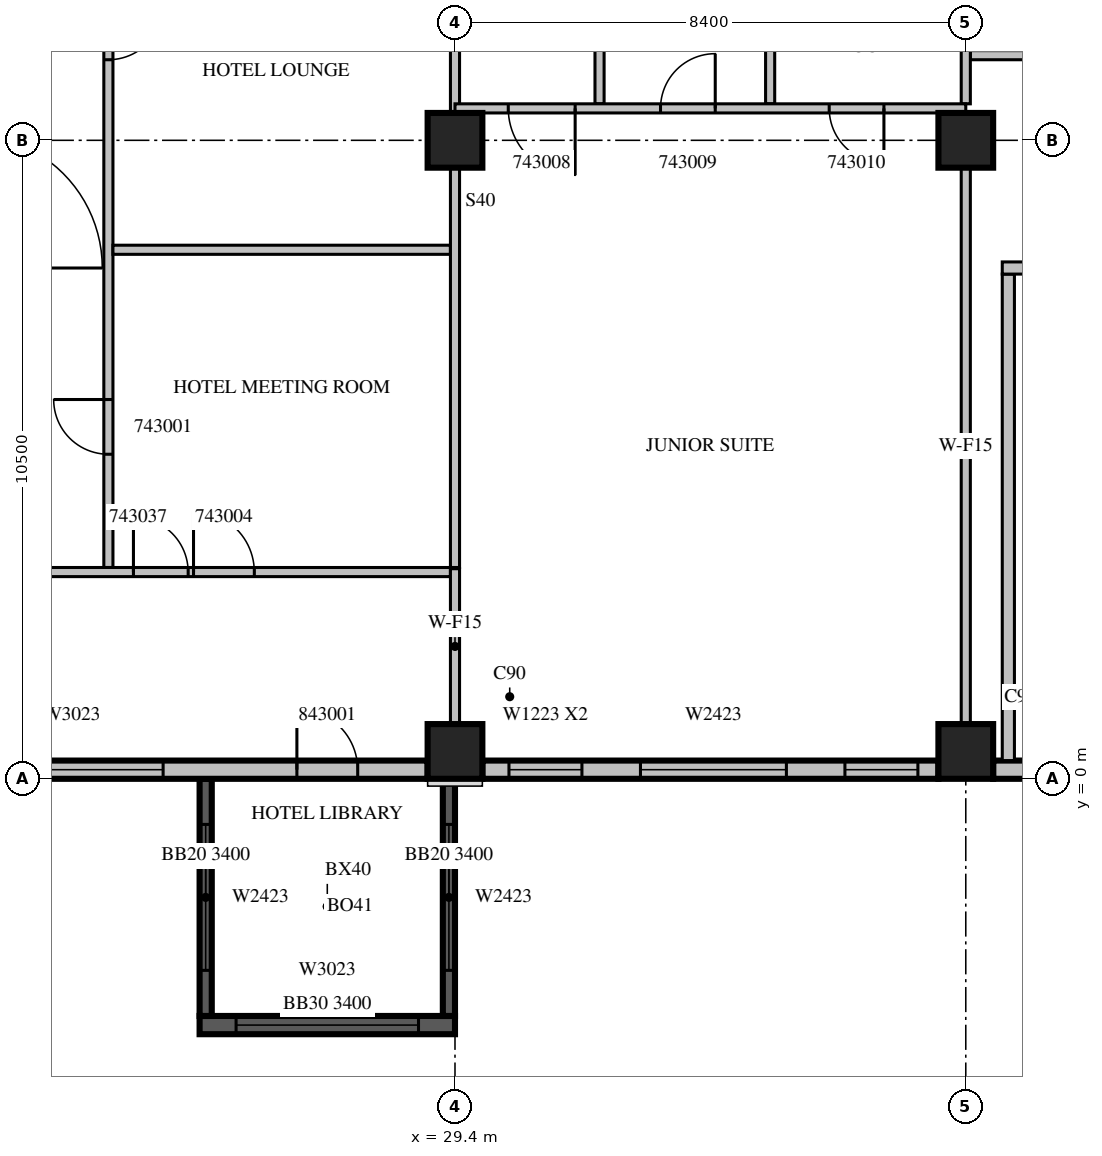
"""IFC4 building model, lengths in metres.
Left out: names, types, materials, properties, quantities, classifications, styles, units other than length and angle.
Written with IfcOpenShell. Run it as: python <this file> out.ifc"""

import sys

from ifc_helpers import new_model, si_unit, direction, frame, frame_2d, origin, origin_2d, place, context, subcontext, project, spatial, rectangle, extrude, source, transform, mapped, element, fill, save


model = new_model("IFC4")
c1 = context("Model", 3, precision=1e-05, world=origin(), true_north=direction((0.0, 1.0)))
c2 = subcontext(c1, "Body", "Model", "MODEL_VIEW")
j1 = project(units=[si_unit("LENGTHUNIT", "METRE"), si_unit("PLANEANGLEUNIT", "RADIAN")], contexts=[c1])
p1 = place(None, origin())
s1 = spatial("IfcSite", under=j1, at=p1, CompositionType="ELEMENT")
p2 = place(p1, origin())
s2 = spatial("IfcBuilding", under=s1, at=p2, CompositionType="ELEMENT")
p3 = place(p2, frame((0.0, 0.0, 196.8)))
s3 = spatial("IfcBuildingStorey", under=s2, at=p3, CompositionType="ELEMENT", Elevation=196.8)
m1 = source(origin(), c2, "Body", "SweptSolid", [
    extrude(rectangle(XDim=0.9, YDim=0.9, at=origin_2d()), origin(), (0.0, 0.0, 1.0), 3.8),
])
for number, where, z_axis, x_axis in (
    (1, (29.4, 0.45, 0.0), (0.0, 0.0, 1.0), (1.0, 0.0, 0.0)),
    (2, (37.8, 0.45, 0.0), (0.0, 0.0, 1.0), (1.0, 0.0, 0.0)),
    (3, (29.4, 10.5, 0.0), (0.0, 0.0, 1.0), (1.0, 0.0, 0.0)),
    (4, (37.8, 10.5, 0.0), (0.0, 0.0, 1.0), (1.0, 0.0, 0.0)),
):
    element("IfcColumn", number, at=place(p3, frame(where, z_axis=z_axis, x_axis=x_axis)), inside=s3, PredefinedType="COLUMN", context=c2, shape_type="MappedRepresentation", body=[
        mapped(m1, transform((0.0, 0.0, 0.0), scale=1.0)),
    ])
m2 = source(origin(), c2, "Body", "SweptSolid", [
    extrude(rectangle(XDim=4.2, YDim=0.3, at=frame_2d((2.1, 0.0))), origin(), (0.0, 0.0, 1.0), 3.4),
])
p4 = place(p3, frame((25.2, -4.05, 0.0), z_axis=(0.0, 0.0, 1.0), x_axis=(1.0, 0.0, 0.0)))
e5 = element("IfcWall", 5, at=p4, inside=s3, PredefinedType="SOLIDWALL", context=c2, shape_type="MappedRepresentation", body=[
    mapped(m2, transform((0.0, 0.0, 0.0), scale=1.0)),
])
m3 = source(origin(), c2, "Body", "SweptSolid", [
    extrude(rectangle(XDim=3.0, YDim=2.3, at=frame_2d((1.5, 1.15))), frame((0.0, 0.16, 0.0), z_axis=(0.0, -1.0, 0.0), x_axis=(1.0, 0.0, 0.0)), (0.0, 0.0, 1.0), 0.32),
])
p5 = place(p4, frame((0.6, 0.0, 0.6)))
e6 = element("IfcOpeningElement", 6, at=p5, cuts=e5, PredefinedType="OPENING", context=c2, shape_type="MappedRepresentation", body=[
    mapped(m3, transform((0.0, 0.0, 0.0), scale=1.0)),
])
m4 = source(origin(), c2, "Body", "SweptSolid", [
    extrude(rectangle(XDim=3.9, YDim=0.2, at=frame_2d((1.95, 0.0))), origin(), (0.0, 0.0, 1.0), 3.4),
])
p6 = place(p3, frame((25.3, 0.0, 0.0), z_axis=(0.0, 0.0, 1.0), x_axis=(0.0, -1.0, 0.0)))
e7 = element("IfcWall", 7, at=p6, inside=s3, PredefinedType="SOLIDWALL", context=c2, shape_type="MappedRepresentation", body=[
    mapped(m4, transform((0.0, 0.0, 0.0), scale=1.0)),
])
m5 = source(origin(), c2, "Body", "SweptSolid", [
    extrude(rectangle(XDim=2.4, YDim=2.3, at=frame_2d((1.2, 1.15))), frame((0.0, 0.11, 0.0), z_axis=(0.0, -1.0, 0.0), x_axis=(1.0, 0.0, 0.0)), (0.0, 0.0, 1.0), 0.22),
])
p7 = place(p6, frame((0.75, 0.0, 0.6)))
e8 = element("IfcOpeningElement", 8, at=p7, cuts=e7, PredefinedType="OPENING", context=c2, shape_type="MappedRepresentation", body=[
    mapped(m5, transform((0.0, 0.0, 0.0), scale=1.0)),
])
p8 = place(p3, frame((29.3, 0.0, 0.0), z_axis=(0.0, 0.0, 1.0), x_axis=(0.0, -1.0, 0.0)))
e9 = element("IfcWall", 9, at=p8, inside=s3, PredefinedType="SOLIDWALL", context=c2, shape_type="MappedRepresentation", body=[
    mapped(m4, transform((0.0, 0.0, 0.0), scale=1.0)),
])
p9 = place(p8, frame((0.75, 0.0, 0.6)))
e10 = element("IfcOpeningElement", 10, at=p9, cuts=e9, PredefinedType="OPENING", context=c2, shape_type="MappedRepresentation", body=[
    mapped(m5, transform((0.0, 0.0, 0.0), scale=1.0)),
])
m6 = source(origin(), c2, "Body", "SweptSolid", [
    extrude(rectangle(XDim=7.5, YDim=0.3, at=frame_2d((3.75, 0.0))), origin(), (0.0, 0.0, 1.0), 3.4),
])
p10 = place(p3, frame((21.45, 0.15, 0.0), z_axis=(0.0, 0.0, 1.0), x_axis=(1.0, 0.0, 0.0)))
e11 = element("IfcWall", 11, at=p10, inside=s3, PredefinedType="STANDARD", context=c2, shape_type="MappedRepresentation", body=[
    mapped(m6, transform((0.0, 0.0, 0.0), scale=1.0)),
])
p11 = place(p10, frame((0.15, 0.0, 0.6)))
e12 = element("IfcOpeningElement", 12, at=p11, cuts=e11, PredefinedType="OPENING", context=c2, shape_type="MappedRepresentation", body=[
    mapped(m3, transform((0.0, 0.0, 0.0), scale=1.0)),
])
m7 = source(origin(), c2, "Body", "SweptSolid", [
    extrude(rectangle(XDim=1.0, YDim=2.1, at=frame_2d((0.5, 1.05))), frame((0.0, 0.16, 0.0), z_axis=(0.0, -1.0, 0.0), x_axis=(1.0, 0.0, 0.0)), (0.0, 0.0, 1.0), 0.32),
])
p12 = place(p10, frame((5.35, 0.0, 0.0)))
e13 = element("IfcOpeningElement", 13, at=p12, cuts=e11, PredefinedType="OPENING", context=c2, shape_type="MappedRepresentation", body=[
    mapped(m7, transform((0.0, 0.0, 0.0), scale=1.0)),
])
p13 = place(p3, frame((29.85, 0.15, 0.0), z_axis=(0.0, 0.0, 1.0), x_axis=(1.0, 0.0, 0.0)))
e14 = element("IfcWall", 14, at=p13, inside=s3, PredefinedType="STANDARD", context=c2, shape_type="MappedRepresentation", body=[
    mapped(m6, transform((0.0, 0.0, 0.0), scale=1.0)),
])
m8 = source(origin(), c2, "Body", "SweptSolid", [
    extrude(rectangle(XDim=1.2, YDim=2.3, at=frame_2d((0.6, 1.15))), frame((0.0, 0.16, 0.0), z_axis=(0.0, -1.0, 0.0), x_axis=(1.0, 0.0, 0.0)), (0.0, 0.0, 1.0), 0.32),
])
p14 = place(p13, frame((0.438, 0.0, 0.6)))
e15 = element("IfcOpeningElement", 15, at=p14, cuts=e14, PredefinedType="OPENING", context=c2, shape_type="MappedRepresentation", body=[
    mapped(m8, transform((0.0, 0.0, 0.0), scale=1.0)),
])
p15 = place(p13, frame((5.963, 0.0, 0.6)))
e16 = element("IfcOpeningElement", 16, at=p15, cuts=e14, PredefinedType="OPENING", context=c2, shape_type="MappedRepresentation", body=[
    mapped(m8, transform((0.0, 0.0, 0.0), scale=1.0)),
])
m9 = source(origin(), c2, "Body", "SweptSolid", [
    extrude(rectangle(XDim=2.4, YDim=2.3, at=frame_2d((1.2, 1.15))), frame((0.0, 0.16, 0.0), z_axis=(0.0, -1.0, 0.0), x_axis=(1.0, 0.0, 0.0)), (0.0, 0.0, 1.0), 0.32),
])
p16 = place(p13, frame((2.6, 0.0, 0.6)))
e17 = element("IfcOpeningElement", 17, at=p16, cuts=e14, PredefinedType="OPENING", context=c2, shape_type="MappedRepresentation", body=[
    mapped(m9, transform((0.0, 0.0, 0.0), scale=1.0)),
])
m10 = source(origin(), c2, "Body", "SweptSolid", [
    extrude(rectangle(XDim=1.95, YDim=0.3, at=frame_2d((0.975, 0.0))), origin(), (0.0, 0.0, 1.0), 3.4),
])
p17 = place(p3, frame((38.25, 0.15, 0.0), z_axis=(0.0, 0.0, 1.0), x_axis=(1.0, 0.0, 0.0)))
e18 = element("IfcWall", 18, at=p17, inside=s3, PredefinedType="STANDARD", context=c2, shape_type="MappedRepresentation", body=[
    mapped(m10, transform((0.0, 0.0, 0.0), scale=1.0)),
])
m11 = source(origin(), c2, "Body", "SweptSolid", [
    extrude(rectangle(XDim=8.0, YDim=0.2, at=frame_2d((4.0, 0.0))), origin(), (0.0, 0.0, 1.0), 3.4),
])
p18 = place(p3, frame((38.5, 0.3, 0.0), z_axis=(0.0, 0.0, 1.0), x_axis=(0.0, 1.0, 0.0)))
e19 = element("IfcWall", 19, at=p18, inside=s3, PredefinedType="PARTITIONING", context=c2, shape_type="MappedRepresentation", body=[
    mapped(m11, transform((0.0, 0.0, 0.0), scale=1.0)),
])
m12 = source(origin(), c2, "Body", "SweptSolid", [
    extrude(rectangle(XDim=5.45, YDim=0.2, at=frame_2d((2.725, 0.0))), origin(), (0.0, 0.0, 1.0), 3.4),
])
p19 = place(p3, frame((38.4, 8.4, 0.0), z_axis=(0.0, 0.0, 1.0), x_axis=(1.0, 0.0, 0.0)))
e20 = element("IfcWall", 20, at=p19, inside=s3, PredefinedType="PARTITIONING", context=c2, shape_type="MappedRepresentation", body=[
    mapped(m12, transform((0.0, 0.0, 0.0), scale=1.0)),
])
m13 = source(origin(), c2, "Body", "SweptSolid", [
    extrude(rectangle(XDim=1.2, YDim=2.1, at=frame_2d((0.6, 1.05))), frame((0.0, 0.11, 0.0), z_axis=(0.0, -1.0, 0.0), x_axis=(1.0, 0.0, 0.0)), (0.0, 0.0, 1.0), 0.22),
])
p20 = place(p19, frame((0.4, 0.0, 0.0)))
e21 = element("IfcOpeningElement", 21, at=p20, cuts=e20, PredefinedType="OPENING", context=c2, shape_type="MappedRepresentation", body=[
    mapped(m13, transform((0.0, 0.0, 0.0), scale=1.0)),
])
m14 = source(origin(), c2, "Body", "SweptSolid", [
    extrude(rectangle(XDim=0.9, YDim=2.1, at=frame_2d((0.45, 1.05))), frame((0.0, 0.11, 0.0), z_axis=(0.0, -1.0, 0.0), x_axis=(1.0, 0.0, 0.0)), (0.0, 0.0, 1.0), 0.22),
])
p21 = place(p19, frame((3.25, 0.0, 0.0)))
e22 = element("IfcOpeningElement", 22, at=p21, cuts=e20, PredefinedType="OPENING", context=c2, shape_type="MappedRepresentation", body=[
    mapped(m14, transform((0.0, 0.0, 0.0), scale=1.0)),
])
p22 = place(p3, frame((23.7, 14.7, 0.0), z_axis=(0.0, 0.0, 1.0), x_axis=(0.0, -1.0, 0.0)))
e23 = element("IfcWall", 23, at=p22, inside=s3, PredefinedType="PARTITIONING", context=c2, shape_type="SweptSolid", body=[
    extrude(rectangle(XDim=11.225, YDim=0.15, at=frame_2d((5.612, 0.0))), origin(), (0.0, 0.0, 1.0), 3.4),
])
m15 = source(origin(), c2, "Body", "SweptSolid", [
    extrude(rectangle(XDim=0.9, YDim=2.1, at=frame_2d((0.45, 1.05))), frame((0.0, 0.085, 0.0), z_axis=(0.0, -1.0, 0.0), x_axis=(1.0, 0.0, 0.0)), (0.0, 0.0, 1.0), 0.17),
])
p23 = place(p22, frame((8.463, 0.0, 0.0)))
e24 = element("IfcOpeningElement", 24, at=p23, cuts=e23, PredefinedType="OPENING", context=c2, shape_type="MappedRepresentation", body=[
    mapped(m15, transform((0.0, 0.0, 0.0), scale=1.0)),
])
p24 = place(p22, frame((1.975, 0.0, 0.0)))
e25 = element("IfcOpeningElement", 25, at=p24, cuts=e23, PredefinedType="OPENING", context=c2, shape_type="MappedRepresentation", body=[
    mapped(m15, transform((0.0, 0.0, 0.0), scale=1.0)),
])
m16 = source(origin(), c2, "Body", "SweptSolid", [
    extrude(rectangle(XDim=5.55, YDim=0.15, at=frame_2d((2.775, 0.0))), origin(), (0.0, 0.0, 1.0), 3.4),
])
p25 = place(p3, frame((29.325, 8.7, 0.0), z_axis=(0.0, 0.0, 1.0), x_axis=(-1.0, 0.0, 0.0)))
e26 = element("IfcWall", 26, at=p25, inside=s3, PredefinedType="PARTITIONING", context=c2, shape_type="MappedRepresentation", body=[
    mapped(m16, transform((0.0, 0.0, 0.0), scale=1.0)),
])
m17 = source(origin(), c2, "Body", "SweptSolid", [
    extrude(rectangle(XDim=6.576, YDim=0.15, at=frame_2d((3.288, 0.0))), origin(), (0.0, 0.0, 1.0), 3.4),
])
p26 = place(p3, frame((29.4, 3.475, 0.0), z_axis=(0.0, 0.0, 1.0), x_axis=(0.0, 1.0, 0.0)))
e27 = element("IfcWall", 27, at=p26, inside=s3, PredefinedType="PARTITIONING", context=c2, shape_type="MappedRepresentation", body=[
    mapped(m17, transform((0.0, 0.0, 0.0), scale=1.0)),
])
m18 = source(origin(), c2, "Body", "SweptSolid", [
    extrude(rectangle(XDim=3.751, YDim=0.15, at=frame_2d((1.875, 0.0))), origin(), (0.0, 0.0, 1.0), 3.4),
])
p27 = place(p3, frame((29.4, 10.949, 0.0), z_axis=(0.0, 0.0, 1.0), x_axis=(0.0, 1.0, 0.0)))
e28 = element("IfcWall", 28, at=p27, inside=s3, PredefinedType="PARTITIONING", context=c2, shape_type="MappedRepresentation", body=[
    mapped(m18, transform((0.0, 0.0, 0.0), scale=1.0)),
])
m19 = source(origin(), c2, "Body", "SweptSolid", [
    extrude(rectangle(XDim=7.525, YDim=0.15, at=frame_2d((3.763, 0.0))), origin(), (0.0, 0.0, 1.0), 3.4),
])
p28 = place(p3, frame((21.8, 3.4, 0.0), z_axis=(0.0, 0.0, 1.0), x_axis=(1.0, 0.0, 0.0)))
e29 = element("IfcWall", 29, at=p28, inside=s3, PredefinedType="PARTITIONING", context=c2, shape_type="MappedRepresentation", body=[
    mapped(m19, transform((0.0, 0.0, 0.0), scale=1.0)),
])
m20 = source(origin(), c2, "Body", "SweptSolid", [
    extrude(rectangle(XDim=1.0, YDim=2.1, at=frame_2d((0.5, 1.05))), frame((0.0, 0.085, 0.0), z_axis=(0.0, -1.0, 0.0), x_axis=(1.0, 0.0, 0.0)), (0.0, 0.0, 1.0), 0.17),
])
p29 = place(p28, frame((3.3, 0.0, 0.0)))
e30 = element("IfcOpeningElement", 30, at=p29, cuts=e29, PredefinedType="OPENING", context=c2, shape_type="MappedRepresentation", body=[
    mapped(m20, transform((0.0, 0.0, 0.0), scale=1.0)),
])
p30 = place(p28, frame((2.312, 0.0, 0.0)))
e31 = element("IfcOpeningElement", 31, at=p30, cuts=e29, PredefinedType="OPENING", context=c2, shape_type="MappedRepresentation", body=[
    mapped(m15, transform((0.0, 0.0, 0.0), scale=1.0)),
])
m21 = source(origin(), c2, "Body", "SweptSolid", [
    extrude(rectangle(XDim=6.45, YDim=0.15, at=frame_2d((3.225, 0.0))), origin(), (0.0, 0.0, 1.0), 3.4),
])
p31 = place(p3, frame((37.875, 11.9, 0.0), z_axis=(0.0, 0.0, 1.0), x_axis=(1.0, 0.0, 0.0)))
e32 = element("IfcWall", 32, at=p31, inside=s3, PredefinedType="PARTITIONING", context=c2, shape_type="MappedRepresentation", body=[
    mapped(m21, transform((0.0, 0.0, 0.0), scale=1.0)),
])
m22 = source(origin(), c2, "Body", "SweptSolid", [
    extrude(rectangle(XDim=3.6, YDim=0.15, at=frame_2d((1.8, 0.0))), origin(), (0.0, 0.0, 1.0), 3.4),
])
for number, where, z_axis, x_axis in (
    (33, (31.777, 11.1, 0.0), (0.0, 0.0, 1.0), (0.0, 1.0, 0.0)),
    (34, (34.583, 11.1, 0.0), (0.0, 0.0, 1.0), (0.0, 1.0, 0.0)),
):
    element("IfcWall", number, at=place(p3, frame(where, z_axis=z_axis, x_axis=x_axis)), inside=s3, PredefinedType="PARTITIONING", context=c2, shape_type="MappedRepresentation", body=[
        mapped(m22, transform((0.0, 0.0, 0.0), scale=1.0)),
    ])
m23 = source(origin(), c2, "Body", "SweptSolid", [
    extrude(rectangle(XDim=2.556, YDim=0.15, at=frame_2d((1.278, 0.0))), origin(), (0.0, 0.0, 1.0), 3.4),
])
p32 = place(p3, frame((29.4, 0.899, 0.0), z_axis=(0.0, 0.0, 1.0), x_axis=(0.0, 1.0, 0.0)))
e35 = element("IfcWall", 35, at=p32, inside=s3, PredefinedType="PARTITIONING", context=c2, shape_type="MappedRepresentation", body=[
    mapped(m23, transform((0.0, 0.0, 0.0), scale=1.0)),
])
m24 = source(origin(), c2, "Body", "SweptSolid", [
    extrude(rectangle(XDim=9.152, YDim=0.15, at=frame_2d((4.576, 0.0))), origin(), (0.0, 0.0, 1.0), 3.4),
])
p33 = place(p3, frame((37.8, 0.899, 0.0), z_axis=(0.0, 0.0, 1.0), x_axis=(0.0, 1.0, 0.0)))
e36 = element("IfcWall", 36, at=p33, inside=s3, PredefinedType="PARTITIONING", context=c2, shape_type="MappedRepresentation", body=[
    mapped(m24, transform((0.0, 0.0, 0.0), scale=1.0)),
])
p34 = place(p3, frame((37.8, 11.1, 0.0), z_axis=(0.0, 0.0, 1.0), x_axis=(0.0, 1.0, 0.0)))
e37 = element("IfcWall", 37, at=p34, inside=s3, PredefinedType="PARTITIONING", context=c2, shape_type="MappedRepresentation", body=[
    mapped(m22, transform((0.0, 0.0, 0.0), scale=1.0)),
])
m25 = source(origin(), c2, "Body", "SweptSolid", [
    extrude(rectangle(XDim=8.4, YDim=0.15, at=frame_2d((4.2, 0.0))), origin(), (0.0, 0.0, 1.0), 3.4),
])
p35 = place(p3, frame((37.8, 11.025, 0.0), z_axis=(0.0, 0.0, 1.0), x_axis=(-1.0, 0.0, 0.0)))
e38 = element("IfcWall", 38, at=p35, inside=s3, PredefinedType="PARTITIONING", context=c2, shape_type="MappedRepresentation", body=[
    mapped(m25, transform((0.0, 0.0, 0.0), scale=1.0)),
])
m26 = source(origin(), c2, "Body", "SweptSolid", [
    extrude(rectangle(XDim=1.1, YDim=2.1, at=frame_2d((0.55, 1.05))), frame((0.0, 0.085, 0.0), z_axis=(0.0, -1.0, 0.0), x_axis=(1.0, 0.0, 0.0)), (0.0, 0.0, 1.0), 0.17),
])
p36 = place(p35, frame((6.424, 0.0, 0.0)))
e39 = element("IfcOpeningElement", 39, at=p36, cuts=e38, PredefinedType="OPENING", context=c2, shape_type="MappedRepresentation", body=[
    mapped(m26, transform((0.0, 0.0, 0.0), scale=1.0)),
])
p37 = place(p35, frame((4.12, 0.0, 0.0)))
e40 = element("IfcOpeningElement", 40, at=p37, cuts=e38, PredefinedType="OPENING", context=c2, shape_type="MappedRepresentation", body=[
    mapped(m15, transform((0.0, 0.0, 0.0), scale=1.0)),
])
p38 = place(p35, frame((1.346, 0.0, 0.0)))
e41 = element("IfcOpeningElement", 41, at=p38, cuts=e38, PredefinedType="OPENING", context=c2, shape_type="MappedRepresentation", body=[
    mapped(m15, transform((0.0, 0.0, 0.0), scale=1.0)),
])
m27 = source(origin(), c2, "Body", "SweptSolid", [
    extrude(rectangle(XDim=3.0, YDim=2.3, at=frame_2d((1.5, 1.15))), frame((0.0, 0.03, 0.0), z_axis=(0.0, -1.0, 0.0), x_axis=(1.0, 0.0, 0.0)), (0.0, 0.0, 1.0), 0.06),
])
p39 = place(p5, origin())
e42 = element("IfcWindow", 42, at=p39, inside=s3, PartitioningType="SINGLE_PANEL", PredefinedType="WINDOW", context=c2, shape_type="MappedRepresentation", body=[
    mapped(m27, transform((0.0, 0.0, 0.0), scale=1.0)),
])
fill(e6, e42)
m28 = source(origin(), c2, "Body", "SweptSolid", [
    extrude(rectangle(XDim=2.4, YDim=2.3, at=frame_2d((1.2, 1.15))), frame((0.0, 0.03, 0.0), z_axis=(0.0, -1.0, 0.0), x_axis=(1.0, 0.0, 0.0)), (0.0, 0.0, 1.0), 0.06),
])
p40 = place(p7, origin())
e43 = element("IfcWindow", 43, at=p40, inside=s3, PartitioningType="SINGLE_PANEL", PredefinedType="WINDOW", context=c2, shape_type="MappedRepresentation", body=[
    mapped(m28, transform((0.0, 0.0, 0.0), scale=1.0)),
])
fill(e8, e43)
p41 = place(p9, origin())
e44 = element("IfcWindow", 44, at=p41, inside=s3, PartitioningType="SINGLE_PANEL", PredefinedType="WINDOW", context=c2, shape_type="MappedRepresentation", body=[
    mapped(m28, transform((0.0, 0.0, 0.0), scale=1.0)),
])
fill(e10, e44)
p42 = place(p11, origin())
e45 = element("IfcWindow", 45, at=p42, inside=s3, PartitioningType="SINGLE_PANEL", PredefinedType="WINDOW", context=c2, shape_type="MappedRepresentation", body=[
    mapped(m27, transform((0.0, 0.0, 0.0), scale=1.0)),
])
fill(e12, e45)
m29 = source(origin(), c2, "Body", "SweptSolid", [
    extrude(rectangle(XDim=1.2, YDim=2.3, at=frame_2d((0.6, 1.15))), frame((0.0, 0.03, 0.0), z_axis=(0.0, -1.0, 0.0), x_axis=(1.0, 0.0, 0.0)), (0.0, 0.0, 1.0), 0.06),
])
p43 = place(p14, origin())
e46 = element("IfcWindow", 46, at=p43, inside=s3, PartitioningType="SINGLE_PANEL", PredefinedType="WINDOW", context=c2, shape_type="MappedRepresentation", body=[
    mapped(m29, transform((0.0, 0.0, 0.0), scale=1.0)),
])
fill(e15, e46)
p44 = place(p15, origin())
e47 = element("IfcWindow", 47, at=p44, inside=s3, PartitioningType="SINGLE_PANEL", PredefinedType="WINDOW", context=c2, shape_type="MappedRepresentation", body=[
    mapped(m29, transform((0.0, 0.0, 0.0), scale=1.0)),
])
fill(e16, e47)
p45 = place(p16, origin())
e48 = element("IfcWindow", 48, at=p45, inside=s3, PartitioningType="SINGLE_PANEL", PredefinedType="WINDOW", context=c2, shape_type="MappedRepresentation", body=[
    mapped(m28, transform((0.0, 0.0, 0.0), scale=1.0)),
])
fill(e17, e48)
m30 = source(origin(), c2, "Body", "SweptSolid", [
    extrude(rectangle(XDim=0.9, YDim=2.1, at=frame_2d((0.45, 1.05))), frame((0.0, 0.025, 0.0), z_axis=(0.0, -1.0, 0.0), x_axis=(1.0, 0.0, 0.0)), (0.0, 0.0, 1.0), 0.05),
])
p46 = place(p23, origin())
e49 = element("IfcDoor", 49, at=p46, inside=s3, OperationType="SINGLE_SWING_RIGHT", PredefinedType="DOOR", context=c2, shape_type="MappedRepresentation", body=[
    mapped(m30, transform((0.0, 0.0, 0.0), scale=1.0)),
])
fill(e24, e49)
p47 = place(p24, origin())
e50 = element("IfcDoor", 50, at=p47, inside=s3, OperationType="SINGLE_SWING_LEFT", PredefinedType="DOOR", context=c2, shape_type="MappedRepresentation", body=[
    mapped(m30, transform((0.0, 0.0, 0.0), scale=1.0)),
])
fill(e25, e50)
m31 = source(origin(), c2, "Body", "SweptSolid", [
    extrude(rectangle(XDim=1.0, YDim=2.1, at=frame_2d((0.5, 1.05))), frame((0.0, 0.025, 0.0), z_axis=(0.0, -1.0, 0.0), x_axis=(1.0, 0.0, 0.0)), (0.0, 0.0, 1.0), 0.05),
])
p48 = place(p29, origin())
e51 = element("IfcDoor", 51, at=p48, inside=s3, OperationType="SINGLE_SWING_LEFT", PredefinedType="DOOR", context=c2, shape_type="MappedRepresentation", body=[
    mapped(m31, transform((0.0, 0.0, 0.0), scale=1.0)),
])
fill(e30, e51)
m32 = source(origin(), c2, "Body", "SweptSolid", [
    extrude(rectangle(XDim=1.1, YDim=2.1, at=frame_2d((0.55, 1.05))), frame((0.0, 0.025, 0.0), z_axis=(0.0, -1.0, 0.0), x_axis=(1.0, 0.0, 0.0)), (0.0, 0.0, 1.0), 0.05),
])
p49 = place(p36, origin())
e52 = element("IfcDoor", 52, at=p49, inside=s3, OperationType="SINGLE_SWING_LEFT", PredefinedType="DOOR", context=c2, shape_type="MappedRepresentation", body=[
    mapped(m32, transform((0.0, 0.0, 0.0), scale=1.0)),
])
fill(e39, e52)
p50 = place(p37, origin())
e53 = element("IfcDoor", 53, at=p50, inside=s3, OperationType="SINGLE_SWING_RIGHT", PredefinedType="DOOR", context=c2, shape_type="MappedRepresentation", body=[
    mapped(m30, transform((0.0, 0.0, 0.0), scale=1.0)),
])
fill(e40, e53)
p51 = place(p38, origin())
e54 = element("IfcDoor", 54, at=p51, inside=s3, OperationType="SINGLE_SWING_LEFT", PredefinedType="DOOR", context=c2, shape_type="MappedRepresentation", body=[
    mapped(m30, transform((0.0, 0.0, 0.0), scale=1.0)),
])
fill(e41, e54)
p52 = place(p30, origin())
e55 = element("IfcDoor", 55, at=p52, inside=s3, OperationType="SINGLE_SWING_LEFT", PredefinedType="DOOR", context=c2, shape_type="MappedRepresentation", body=[
    mapped(m30, transform((0.0, 0.0, 0.0), scale=1.0)),
])
fill(e31, e55)
p53 = place(p12, origin())
e56 = element("IfcDoor", 56, at=p53, inside=s3, OperationType="SINGLE_SWING_LEFT", PredefinedType="DOOR", context=c2, shape_type="MappedRepresentation", body=[
    mapped(m31, transform((0.0, 0.0, 0.0), scale=1.0)),
])
fill(e13, e56)
save(model, sys.argv[1])
